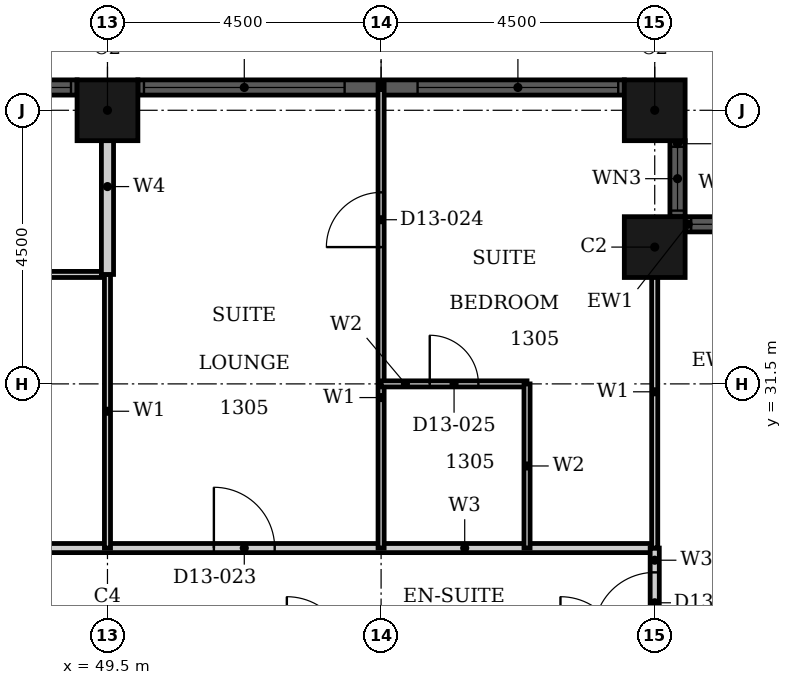
"""IFC4 building model, lengths in metres.
Left out: names, types, materials, properties, quantities, classifications, styles, units other than length and angle.
Written with IfcOpenShell. Run it as: python <this file> out.ifc"""

import sys

from ifc_helpers import new_model, si_unit, direction, frame, frame_2d, origin, origin_2d, place, context, subcontext, project, spatial, rectangle, hollow_rectangle, extrude, element, fill, save


model = new_model("IFC4")
c1 = context("Model", 3, precision=1e-05, world=origin(), true_north=direction((0.0, 1.0)))
c2 = subcontext(c1, "Body", "Model", "MODEL_VIEW")
j1 = project(units=[si_unit("LENGTHUNIT", "METRE"), si_unit("PLANEANGLEUNIT", "RADIAN")], contexts=[c1])
p1 = place(None, origin())
s1 = spatial("IfcSite", under=j1, at=p1, CompositionType="ELEMENT")
p2 = place(p1, origin())
s2 = spatial("IfcBuilding", under=s1, at=p2, CompositionType="ELEMENT")
p3 = place(p2, frame((0.0, 0.0, 60.0)))
s3 = spatial("IfcBuildingStorey", under=s2, at=p3, CompositionType="ELEMENT", Elevation=60.0)
for number, where, z_axis, x_axis in (
    (1, (58.5, 33.75, 0.0), (0.0, 0.0, 1.0), (1.0, 0.0, 0.0)),
    (2, (58.5, 36.0, 0.0), (0.0, 0.0, 1.0), (1.0, 0.0, 0.0)),
    (3, (49.5, 36.0, 0.0), (0.0, 0.0, 1.0), (1.0, 0.0, 0.0)),
):
    element("IfcColumn", number, at=place(p3, frame(where, z_axis=z_axis, x_axis=x_axis)), inside=s3, PredefinedType="COLUMN", context=c2, shape_type="SweptSolid", body=[
        extrude(hollow_rectangle(XDim=1.0, YDim=1.0, WallThickness=0.032, at=origin_2d()), origin(), (0.0, 0.0, 1.0), 3.6),
    ])
p4 = place(p3, frame((60.25, 34.125, 0.0), z_axis=(0.0, 0.0, 1.0), x_axis=(-1.0, 0.0, 0.0)))
e4 = element("IfcWall", 4, at=p4, inside=s3, PredefinedType="SOLIDWALL", context=c2, shape_type="SweptSolid", body=[
    extrude(rectangle(XDim=1.25, YDim=0.25, at=frame_2d((0.625, 0.0))), origin(), (0.0, 0.0, 1.0), 3.6),
])
p5 = place(p4, frame((0.1, 0.0, 0.9)))
e5 = element("IfcOpeningElement", 5, at=p5, cuts=e4, PredefinedType="OPENING", context=c2, shape_type="SweptSolid", body=[
    extrude(rectangle(XDim=1.05, YDim=2.08, at=frame_2d((0.525, 1.04))), frame((0.0, 0.135, 0.0), z_axis=(0.0, -1.0, 0.0), x_axis=(1.0, 0.0, 0.0)), (0.0, 0.0, 1.0), 0.27),
])
p6 = place(p3, frame((58.875, 34.25, 0.0), z_axis=(0.0, 0.0, 1.0), x_axis=(0.0, 1.0, 0.0)))
e6 = element("IfcWall", 6, at=p6, inside=s3, PredefinedType="SOLIDWALL", context=c2, shape_type="SweptSolid", body=[
    extrude(rectangle(XDim=1.25, YDim=0.25, at=frame_2d((0.625, 0.0))), origin(), (0.0, 0.0, 1.0), 3.6),
])
p7 = place(p6, frame((0.1, 0.0, 0.9)))
e7 = element("IfcOpeningElement", 7, at=p7, cuts=e6, PredefinedType="OPENING", context=c2, shape_type="SweptSolid", body=[
    extrude(rectangle(XDim=1.05, YDim=2.08, at=frame_2d((0.525, 1.04))), frame((0.0, 0.135, 0.0), z_axis=(0.0, -1.0, 0.0), x_axis=(1.0, 0.0, 0.0)), (0.0, 0.0, 1.0), 0.27),
])
p8 = place(p3, frame((58.0, 36.375, 0.0), z_axis=(0.0, 0.0, 1.0), x_axis=(-1.0, 0.0, 0.0)))
e8 = element("IfcWall", 8, at=p8, inside=s3, PredefinedType="SOLIDWALL", context=c2, shape_type="SweptSolid", body=[
    extrude(rectangle(XDim=8.0, YDim=0.25, at=frame_2d((4.0, 0.0))), origin(), (0.0, 0.0, 1.0), 3.6),
])
p9 = place(p8, frame((0.1, 0.0, 0.9)))
e9 = element("IfcOpeningElement", 9, at=p9, cuts=e8, PredefinedType="OPENING", context=c2, shape_type="SweptSolid", body=[
    extrude(rectangle(XDim=3.3, YDim=2.08, at=frame_2d((1.65, 1.04))), frame((0.0, 0.135, 0.0), z_axis=(0.0, -1.0, 0.0), x_axis=(1.0, 0.0, 0.0)), (0.0, 0.0, 1.0), 0.27),
])
p10 = place(p8, frame((4.6, 0.0, 0.9)))
e10 = element("IfcOpeningElement", 10, at=p10, cuts=e8, PredefinedType="OPENING", context=c2, shape_type="SweptSolid", body=[
    extrude(rectangle(XDim=3.3, YDim=2.08, at=frame_2d((1.65, 1.04))), frame((0.0, 0.135, 0.0), z_axis=(0.0, -1.0, 0.0), x_axis=(1.0, 0.0, 0.0)), (0.0, 0.0, 1.0), 0.27),
])
p11 = place(p3, frame((49.0, 36.375, 0.0), z_axis=(0.0, 0.0, 1.0), x_axis=(-1.0, 0.0, 0.0)))
e11 = element("IfcWall", 11, at=p11, inside=s3, PredefinedType="SOLIDWALL", context=c2, shape_type="SweptSolid", body=[
    extrude(rectangle(XDim=1.25, YDim=0.25, at=frame_2d((0.625, 0.0))), origin(), (0.0, 0.0, 1.0), 3.6),
])
p12 = place(p11, frame((0.1, 0.0, 0.9)))
e12 = element("IfcOpeningElement", 12, at=p12, cuts=e11, PredefinedType="OPENING", context=c2, shape_type="SweptSolid", body=[
    extrude(rectangle(XDim=1.05, YDim=2.08, at=frame_2d((0.525, 1.04))), frame((0.0, 0.135, 0.0), z_axis=(0.0, -1.0, 0.0), x_axis=(1.0, 0.0, 0.0)), (0.0, 0.0, 1.0), 0.27),
])
p13 = place(p3, frame((46.8, 28.8, 0.0), z_axis=(0.0, 0.0, 1.0), x_axis=(1.0, 0.0, 0.0)))
e13 = element("IfcWall", 13, at=p13, inside=s3, PredefinedType="PARTITIONING", context=c2, shape_type="SweptSolid", body=[
    extrude(rectangle(XDim=11.7, YDim=0.15, at=frame_2d((5.85, 0.0))), origin(), (0.0, 0.0, 1.0), 3.3),
])
p14 = place(p13, frame((4.45, 0.0, 0.0)))
e14 = element("IfcOpeningElement", 14, at=p14, cuts=e13, PredefinedType="OPENING", context=c2, shape_type="SweptSolid", body=[
    extrude(rectangle(XDim=1.0, YDim=2.1, at=frame_2d((0.5, 1.05))), frame((0.0, 0.085, 0.0), z_axis=(0.0, -1.0, 0.0), x_axis=(1.0, 0.0, 0.0)), (0.0, 0.0, 1.0), 0.17),
])
p15 = place(p3, frame((58.5, 27.0, 0.0), z_axis=(0.0, 0.0, 1.0), x_axis=(0.0, 1.0, 0.0)))
e15 = element("IfcWall", 15, at=p15, inside=s3, PredefinedType="PARTITIONING", context=c2, shape_type="SweptSolid", body=[
    extrude(rectangle(XDim=1.8, YDim=0.15, at=frame_2d((0.9, 0.0))), origin(), (0.0, 0.0, 1.0), 3.3),
])
p16 = place(p15, frame((0.4, 0.0, 0.0)))
e16 = element("IfcOpeningElement", 16, at=p16, cuts=e15, PredefinedType="OPENING", context=c2, shape_type="SweptSolid", body=[
    extrude(rectangle(XDim=1.0, YDim=2.1, at=frame_2d((0.5, 1.05))), frame((0.0, 0.085, 0.0), z_axis=(0.0, -1.0, 0.0), x_axis=(1.0, 0.0, 0.0)), (0.0, 0.0, 1.0), 0.17),
])
p17 = place(p3, frame((46.8, 33.3, 0.0), z_axis=(0.0, 0.0, 1.0), x_axis=(1.0, 0.0, 0.0)))
e17 = element("IfcWall", 17, at=p17, inside=s3, PredefinedType="PARTITIONING", context=c2, shape_type="SweptSolid", body=[
    extrude(rectangle(XDim=2.7, YDim=0.1, at=frame_2d((1.35, 0.0))), origin(), (0.0, 0.0, 1.0), 3.3),
])
p18 = place(p3, frame((49.5, 28.8, 0.0), z_axis=(0.0, 0.0, 1.0), x_axis=(0.0, 1.0, 0.0)))
e18 = element("IfcWall", 18, at=p18, inside=s3, PredefinedType="PARTITIONING", context=c2, shape_type="SweptSolid", body=[
    extrude(rectangle(XDim=4.5, YDim=0.1, at=frame_2d((2.25, 0.0))), origin(), (0.0, 0.0, 1.0), 2.38),
])
p19 = place(p3, frame((54.0, 28.8, 0.0), z_axis=(0.0, 0.0, 1.0), x_axis=(0.0, 1.0, 0.0)))
e19 = element("IfcWall", 19, at=p19, inside=s3, PredefinedType="PARTITIONING", context=c2, shape_type="SweptSolid", body=[
    extrude(rectangle(XDim=7.64, YDim=0.1, at=frame_2d((3.82, 0.0))), origin(), (0.0, 0.0, 1.0), 3.3),
])
p20 = place(p19, frame((4.95, 0.0, 0.0)))
e20 = element("IfcOpeningElement", 20, at=p20, cuts=e19, PredefinedType="OPENING", context=c2, shape_type="SweptSolid", body=[
    extrude(rectangle(XDim=0.9, YDim=2.1, at=frame_2d((0.45, 1.05))), frame((0.0, 0.06, 0.0), z_axis=(0.0, -1.0, 0.0), x_axis=(1.0, 0.0, 0.0)), (0.0, 0.0, 1.0), 0.12),
])
p21 = place(p3, frame((58.5, 28.8, 0.0), z_axis=(0.0, 0.0, 1.0), x_axis=(0.0, 1.0, 0.0)))
e21 = element("IfcWall", 21, at=p21, inside=s3, PredefinedType="PARTITIONING", context=c2, shape_type="SweptSolid", body=[
    extrude(rectangle(XDim=5.14, YDim=0.1, at=frame_2d((2.57, 0.0))), origin(), (0.0, 0.0, 1.0), 3.3),
])
p22 = place(p3, frame((49.5, 33.3, 0.0), z_axis=(0.0, 0.0, 1.0), x_axis=(0.0, 1.0, 0.0)))
e22 = element("IfcWall", 22, at=p22, inside=s3, PredefinedType="PARTITIONING", context=c2, shape_type="SweptSolid", body=[
    extrude(rectangle(XDim=2.89, YDim=0.2, at=frame_2d((1.445, 0.0))), origin(), (0.0, 0.0, 1.0), 2.38),
])
p23 = place(p3, frame((54.0, 31.5, 0.0), z_axis=(0.0, 0.0, 1.0), x_axis=(1.0, 0.0, 0.0)))
e23 = element("IfcWall", 23, at=p23, inside=s3, PredefinedType="PARTITIONING", context=c2, shape_type="SweptSolid", body=[
    extrude(rectangle(XDim=2.4, YDim=0.1, at=frame_2d((1.2, 0.0))), origin(), (0.0, 0.0, 1.0), 2.58),
])
p24 = place(p23, frame((0.8, 0.0, 0.0)))
e24 = element("IfcOpeningElement", 24, at=p24, cuts=e23, PredefinedType="OPENING", context=c2, shape_type="SweptSolid", body=[
    extrude(rectangle(XDim=0.8, YDim=2.1, at=frame_2d((0.4, 1.05))), frame((0.0, 0.06, 0.0), z_axis=(0.0, -1.0, 0.0), x_axis=(1.0, 0.0, 0.0)), (0.0, 0.0, 1.0), 0.12),
])
p25 = place(p3, frame((56.4, 28.8, 0.0), z_axis=(0.0, 0.0, 1.0), x_axis=(0.0, 1.0, 0.0)))
e25 = element("IfcWall", 25, at=p25, inside=s3, PredefinedType="PARTITIONING", context=c2, shape_type="SweptSolid", body=[
    extrude(rectangle(XDim=2.7, YDim=0.1, at=frame_2d((1.35, 0.0))), origin(), (0.0, 0.0, 1.0), 3.3),
])
p26 = place(p5, origin())
e26 = element("IfcWindow", 26, at=p26, inside=s3, PartitioningType="SINGLE_PANEL", PredefinedType="WINDOW", context=c2, shape_type="SweptSolid", body=[
    extrude(rectangle(XDim=1.05, YDim=2.08, at=frame_2d((0.525, 1.04))), frame((0.0, 0.03, 0.0), z_axis=(0.0, -1.0, 0.0), x_axis=(1.0, 0.0, 0.0)), (0.0, 0.0, 1.0), 0.06),
])
fill(e5, e26)
p27 = place(p7, origin())
e27 = element("IfcWindow", 27, at=p27, inside=s3, PartitioningType="SINGLE_PANEL", PredefinedType="WINDOW", context=c2, shape_type="SweptSolid", body=[
    extrude(rectangle(XDim=1.05, YDim=2.08, at=frame_2d((0.525, 1.04))), frame((0.0, 0.03, 0.0), z_axis=(0.0, -1.0, 0.0), x_axis=(1.0, 0.0, 0.0)), (0.0, 0.0, 1.0), 0.06),
])
fill(e7, e27)
p28 = place(p9, origin())
e28 = element("IfcWindow", 28, at=p28, inside=s3, PartitioningType="SINGLE_PANEL", PredefinedType="WINDOW", context=c2, shape_type="SweptSolid", body=[
    extrude(rectangle(XDim=3.3, YDim=2.08, at=frame_2d((1.65, 1.04))), frame((0.0, 0.03, 0.0), z_axis=(0.0, -1.0, 0.0), x_axis=(1.0, 0.0, 0.0)), (0.0, 0.0, 1.0), 0.06),
])
fill(e9, e28)
p29 = place(p10, origin())
e29 = element("IfcWindow", 29, at=p29, inside=s3, PartitioningType="SINGLE_PANEL", PredefinedType="WINDOW", context=c2, shape_type="SweptSolid", body=[
    extrude(rectangle(XDim=3.3, YDim=2.08, at=frame_2d((1.65, 1.04))), frame((0.0, 0.03, 0.0), z_axis=(0.0, -1.0, 0.0), x_axis=(1.0, 0.0, 0.0)), (0.0, 0.0, 1.0), 0.06),
])
fill(e10, e29)
p30 = place(p12, origin())
e30 = element("IfcWindow", 30, at=p30, inside=s3, PartitioningType="SINGLE_PANEL", PredefinedType="WINDOW", context=c2, shape_type="SweptSolid", body=[
    extrude(rectangle(XDim=1.05, YDim=2.08, at=frame_2d((0.525, 1.04))), frame((0.0, 0.03, 0.0), z_axis=(0.0, -1.0, 0.0), x_axis=(1.0, 0.0, 0.0)), (0.0, 0.0, 1.0), 0.06),
])
fill(e12, e30)
p31 = place(p14, origin())
e31 = element("IfcDoor", 31, at=p31, inside=s3, OperationType="SINGLE_SWING_RIGHT", PredefinedType="DOOR", context=c2, shape_type="SweptSolid", body=[
    extrude(rectangle(XDim=1.0, YDim=2.1, at=frame_2d((0.5, 1.05))), frame((0.0, 0.025, 0.0), z_axis=(0.0, -1.0, 0.0), x_axis=(1.0, 0.0, 0.0)), (0.0, 0.0, 1.0), 0.05),
])
fill(e14, e31)
p32 = place(p20, origin())
e32 = element("IfcDoor", 32, at=p32, inside=s3, OperationType="SINGLE_SWING_RIGHT", PredefinedType="DOOR", context=c2, shape_type="SweptSolid", body=[
    extrude(rectangle(XDim=0.9, YDim=2.1, at=frame_2d((0.45, 1.05))), frame((0.0, 0.025, 0.0), z_axis=(0.0, -1.0, 0.0), x_axis=(1.0, 0.0, 0.0)), (0.0, 0.0, 1.0), 0.05),
])
fill(e20, e32)
p33 = place(p24, origin())
e33 = element("IfcDoor", 33, at=p33, inside=s3, OperationType="SINGLE_SWING_LEFT", PredefinedType="DOOR", context=c2, shape_type="SweptSolid", body=[
    extrude(rectangle(XDim=0.8, YDim=2.1, at=frame_2d((0.4, 1.05))), frame((0.0, 0.025, 0.0), z_axis=(0.0, -1.0, 0.0), x_axis=(1.0, 0.0, 0.0)), (0.0, 0.0, 1.0), 0.05),
])
fill(e24, e33)
p34 = place(p16, origin())
e34 = element("IfcDoor", 34, at=p34, inside=s3, OperationType="SINGLE_SWING_LEFT", PredefinedType="DOOR", context=c2, shape_type="SweptSolid", body=[
    extrude(rectangle(XDim=1.0, YDim=2.1, at=frame_2d((0.5, 1.05))), frame((0.0, 0.025, 0.0), z_axis=(0.0, -1.0, 0.0), x_axis=(1.0, 0.0, 0.0)), (0.0, 0.0, 1.0), 0.05),
])
fill(e16, e34)
save(model, sys.argv[1])
